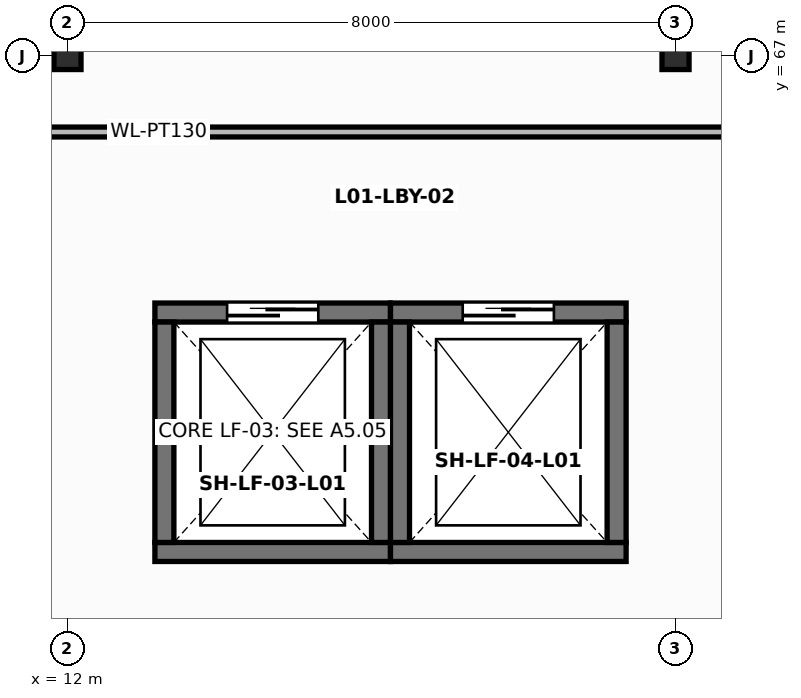
"""IFC4 building model, lengths in metres.
Left out: names, types, materials, properties, quantities, classifications, styles, units other than length and angle.
Written with IfcOpenShell. Run it as: python <this file> out.ifc"""

import sys

from ifc_helpers import new_model, si_unit, direction, frame, frame_2d, origin, origin_2d, place, context, subcontext, project, spatial, rectangle, hollow_rectangle, extrude, element, fill, save


model = new_model("IFC4")
c1 = context("Model", 3, precision=1e-05, world=origin(), true_north=direction((0.0, 1.0)))
c2 = subcontext(c1, "Body", "Model", "MODEL_VIEW")
j1 = project(units=[si_unit("LENGTHUNIT", "METRE"), si_unit("PLANEANGLEUNIT", "RADIAN")], contexts=[c1])
p1 = place(None, origin())
s1 = spatial("IfcSite", under=j1, at=p1, CompositionType="ELEMENT")
p2 = place(p1, origin())
s2 = spatial("IfcBuilding", under=s1, at=p2, CompositionType="ELEMENT")
p3 = place(p2, frame((0.0, 0.0, 6.0)))
s3 = spatial("IfcBuildingStorey", under=s2, at=p3, CompositionType="ELEMENT", Elevation=6.0)
for number, where, z_axis, x_axis in (
    (1, (12.0, 67.0, 0.0), (0.0, 0.0, 1.0), (1.0, 0.0, 0.0)),
    (2, (20.0, 67.0, 0.0), (0.0, 0.0, 1.0), (1.0, 0.0, 0.0)),
):
    element("IfcColumn", number, at=place(p3, frame(where, z_axis=z_axis, x_axis=x_axis)), inside=s3, PredefinedType="COLUMN", context=c2, shape_type="SweptSolid", body=[
        extrude(hollow_rectangle(XDim=0.356, YDim=0.356, WallThickness=0.015, at=origin_2d()), origin(), (0.0, 0.0, 1.0), 5.2),
    ])
p4 = place(p3, frame((13.15, 60.475, 0.0), z_axis=(0.0, 0.0, 1.0), x_axis=(1.0, 0.0, 0.0)))
e3 = element("IfcWall", 3, at=p4, inside=s3, PredefinedType="SOLIDWALL", context=c2, shape_type="SweptSolid", body=[
    extrude(rectangle(XDim=3.1, YDim=0.25, at=frame_2d((1.55, 0.0))), origin(), (0.0, 0.0, 1.0), 4.945),
])
p5 = place(p3, frame((16.25, 63.625, 0.0), z_axis=(0.0, 0.0, 1.0), x_axis=(-1.0, 0.0, 0.0)))
e4 = element("IfcWall", 4, at=p5, inside=s3, PredefinedType="SOLIDWALL", context=c2, shape_type="SweptSolid", body=[
    extrude(rectangle(XDim=3.1, YDim=0.25, at=frame_2d((1.55, 0.0))), origin(), (0.0, 0.0, 1.0), 4.945),
])
p6 = place(p5, frame((0.95, 0.0, 0.0)))
e5 = element("IfcOpeningElement", 5, at=p6, cuts=e4, PredefinedType="OPENING", context=c2, shape_type="SweptSolid", body=[
    extrude(rectangle(XDim=1.2, YDim=2.2, at=frame_2d((0.6, 1.1))), frame((0.0, 0.135, 0.0), z_axis=(0.0, -1.0, 0.0), x_axis=(1.0, 0.0, 0.0)), (0.0, 0.0, 1.0), 0.27),
])
for number, where, z_axis, x_axis in (
    (6, (16.125, 60.6, 0.0), (0.0, 0.0, 1.0), (0.0, 1.0, 0.0)),
    (7, (13.275, 63.5, 0.0), (0.0, 0.0, 1.0), (0.0, -1.0, 0.0)),
):
    element("IfcWall", number, at=place(p3, frame(where, z_axis=z_axis, x_axis=x_axis)), inside=s3, PredefinedType="SOLIDWALL", context=c2, shape_type="SweptSolid", body=[
        extrude(rectangle(XDim=2.9, YDim=0.25, at=frame_2d((1.45, 0.0))), origin(), (0.0, 0.0, 1.0), 4.945),
    ])
p7 = place(p3, frame((16.25, 60.475, 0.0), z_axis=(0.0, 0.0, 1.0), x_axis=(1.0, 0.0, 0.0)))
e8 = element("IfcWall", 8, at=p7, inside=s3, PredefinedType="SOLIDWALL", context=c2, shape_type="SweptSolid", body=[
    extrude(rectangle(XDim=3.1, YDim=0.25, at=frame_2d((1.55, 0.0))), origin(), (0.0, 0.0, 1.0), 4.945),
])
p8 = place(p3, frame((19.35, 63.625, 0.0), z_axis=(0.0, 0.0, 1.0), x_axis=(-1.0, 0.0, 0.0)))
e9 = element("IfcWall", 9, at=p8, inside=s3, PredefinedType="SOLIDWALL", context=c2, shape_type="SweptSolid", body=[
    extrude(rectangle(XDim=3.1, YDim=0.25, at=frame_2d((1.55, 0.0))), origin(), (0.0, 0.0, 1.0), 4.945),
])
p9 = place(p8, frame((0.95, 0.0, 0.0)))
e10 = element("IfcOpeningElement", 10, at=p9, cuts=e9, PredefinedType="OPENING", context=c2, shape_type="SweptSolid", body=[
    extrude(rectangle(XDim=1.2, YDim=2.2, at=frame_2d((0.6, 1.1))), frame((0.0, 0.135, 0.0), z_axis=(0.0, -1.0, 0.0), x_axis=(1.0, 0.0, 0.0)), (0.0, 0.0, 1.0), 0.27),
])
for number, where, z_axis, x_axis in (
    (11, (19.225, 60.6, 0.0), (0.0, 0.0, 1.0), (0.0, 1.0, 0.0)),
    (12, (16.375, 63.5, 0.0), (0.0, 0.0, 1.0), (0.0, -1.0, 0.0)),
):
    element("IfcWall", number, at=place(p3, frame(where, z_axis=z_axis, x_axis=x_axis)), inside=s3, PredefinedType="SOLIDWALL", context=c2, shape_type="SweptSolid", body=[
        extrude(rectangle(XDim=2.9, YDim=0.25, at=frame_2d((1.45, 0.0))), origin(), (0.0, 0.0, 1.0), 4.945),
    ])
p10 = place(p3, frame((5.465, 66.0, 0.0), z_axis=(0.0, 0.0, 1.0), x_axis=(1.0, 0.0, 0.0)))
e13 = element("IfcWall", 13, at=p10, inside=s3, PredefinedType="PARTITIONING", context=c2, shape_type="SweptSolid", body=[
    extrude(rectangle(XDim=15.47, YDim=0.13, at=frame_2d((7.735, 0.0))), origin(), (0.0, 0.0, 1.0), 4.327),
])
p11 = place(p6, frame((1.2, 0.0, 0.0), z_axis=(0.0, 0.0, 1.0), x_axis=(-1.0, 0.0, 0.0)))
e14 = element("IfcDoor", 14, at=p11, inside=s3, OperationType="DOUBLE_DOOR_SLIDING", PredefinedType="DOOR", context=c2, shape_type="SweptSolid", body=[
    extrude(rectangle(XDim=1.2, YDim=2.2, at=frame_2d((0.6, 1.1))), frame((0.0, 0.025, 0.0), z_axis=(0.0, -1.0, 0.0), x_axis=(1.0, 0.0, 0.0)), (0.0, 0.0, 1.0), 0.05),
])
fill(e5, e14)
p12 = place(p9, frame((1.2, 0.0, 0.0), z_axis=(0.0, 0.0, 1.0), x_axis=(-1.0, 0.0, 0.0)))
e15 = element("IfcDoor", 15, at=p12, inside=s3, OperationType="DOUBLE_DOOR_SLIDING", PredefinedType="DOOR", context=c2, shape_type="SweptSolid", body=[
    extrude(rectangle(XDim=1.2, YDim=2.2, at=frame_2d((0.6, 1.1))), frame((0.0, 0.025, 0.0), z_axis=(0.0, -1.0, 0.0), x_axis=(1.0, 0.0, 0.0)), (0.0, 0.0, 1.0), 0.05),
])
fill(e10, e15)
save(model, sys.argv[1])
